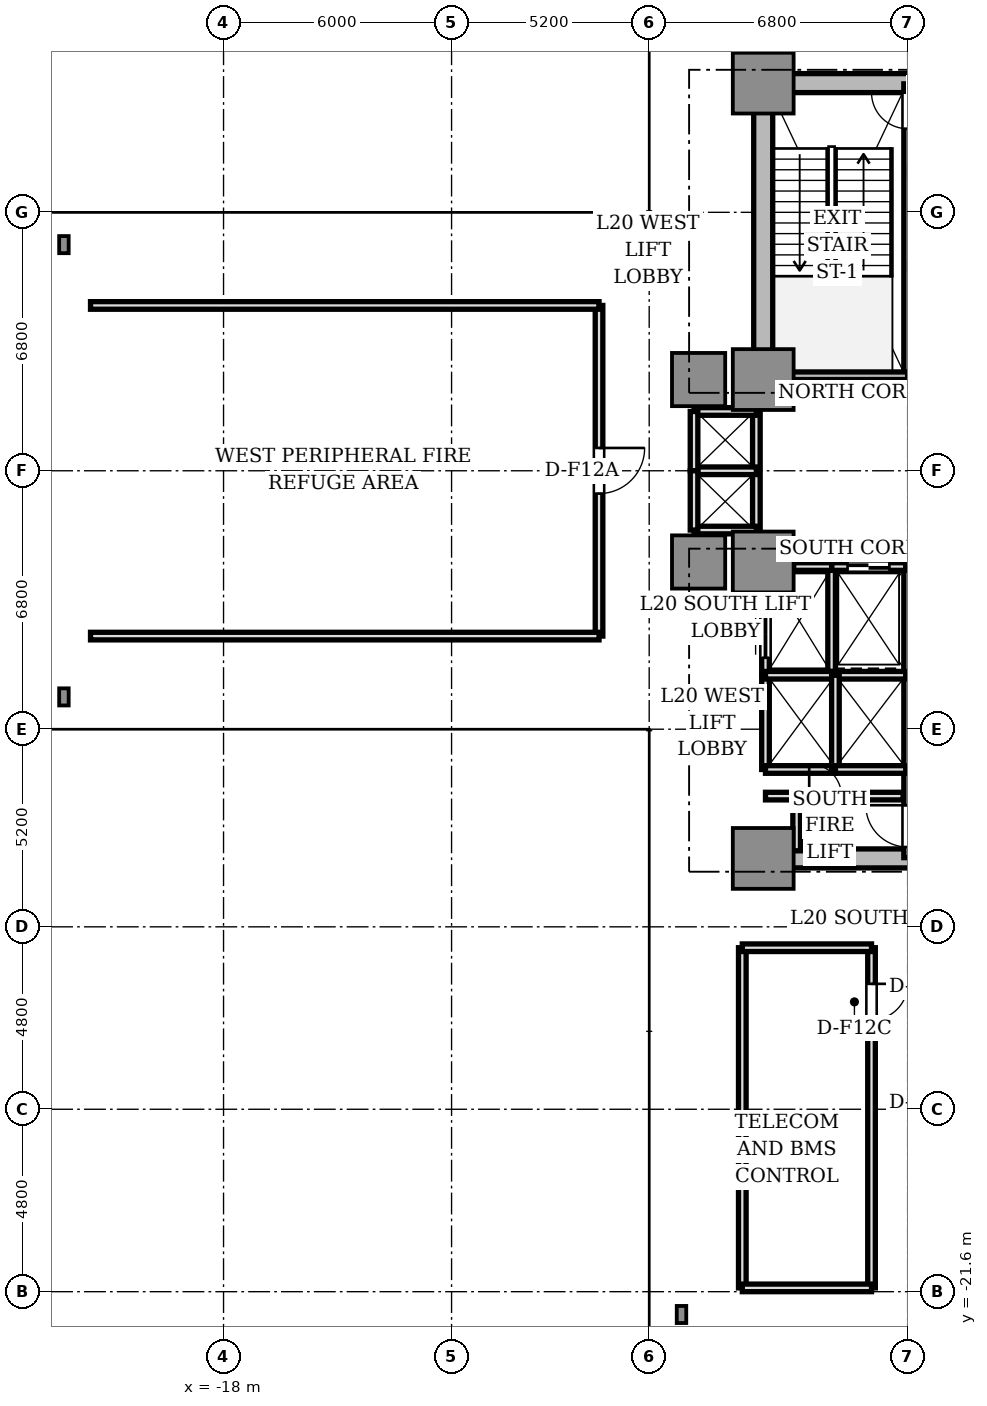
"""IFC4 building model, lengths in metres.
Left out: names, types, materials, properties, quantities, classifications, styles, units other than length and angle.
Written with IfcOpenShell. Run it as: python <this file> out.ifc"""

import sys

from ifc_helpers import new_model, si_unit, direction, frame, frame_2d, origin, origin_2d, place, context, subcontext, project, spatial, rectangle, i_section, extrude, source, transform, mapped, element, fill, save


model = new_model("IFC4")
c1 = context("Model", 3, precision=1e-05, world=origin(), true_north=direction((0.0, 1.0)))
c2 = subcontext(c1, "Body", "Model", "MODEL_VIEW")
j1 = project(units=[si_unit("LENGTHUNIT", "METRE"), si_unit("PLANEANGLEUNIT", "RADIAN")], contexts=[c1])
p1 = place(None, origin())
s1 = spatial("IfcSite", under=j1, at=p1, CompositionType="ELEMENT")
p2 = place(p1, origin())
s2 = spatial("IfcBuilding", under=s1, at=p2, CompositionType="ELEMENT")
p3 = place(p2, frame((0.0, 0.0, 74.5)))
s3 = spatial("IfcBuildingStorey", under=s2, at=p3, CompositionType="ELEMENT", Elevation=74.5)
p4 = place(p3, frame((-3.55, 10.2, 0.0), z_axis=(0.0, 0.0, 1.0), x_axis=(1.0, 0.0, 0.0)))
e1 = element("IfcWall", 1, at=p4, inside=s3, PredefinedType="SHEAR", context=c2, shape_type="SweptSolid", body=[
    extrude(rectangle(XDim=7.1, YDim=0.5, at=frame_2d((3.55, 0.0))), origin(), (0.0, 0.0, 1.0), 4.18),
])
p5 = place(p3, frame((-3.8, 2.85, 0.0), z_axis=(0.0, 0.0, 1.0), x_axis=(0.0, 1.0, 0.0)))
e2 = element("IfcWall", 2, at=p5, inside=s3, PredefinedType="SHEAR", context=c2, shape_type="SweptSolid", body=[
    extrude(rectangle(XDim=6.9, YDim=0.5, at=frame_2d((3.45, 0.0))), origin(), (0.0, 0.0, 1.0), 4.18),
])
p6 = place(p3, frame((-3.55, -10.2, 0.0), z_axis=(0.0, 0.0, 1.0), x_axis=(1.0, 0.0, 0.0)))
e3 = element("IfcWall", 3, at=p6, inside=s3, PredefinedType="SHEAR", context=c2, shape_type="SweptSolid", body=[
    extrude(rectangle(XDim=7.1, YDim=0.5, at=frame_2d((3.55, 0.0))), origin(), (0.0, 0.0, 1.0), 4.18),
])
m1 = source(origin(), c2, "Body", "SweptSolid", [
    extrude(rectangle(XDim=1.6, YDim=1.6, at=origin_2d()), origin(), (0.0, 0.0, 1.0), 4.18),
])
for number, where, z_axis, x_axis in (
    (4, (-3.8, 2.4, 0.0), (0.0, 0.0, 1.0), (1.0, 0.0, 0.0)),
    (5, (-3.8, 10.2, 0.0), (0.0, 0.0, 1.0), (1.0, 0.0, 0.0)),
    (6, (-3.8, -2.4, 0.0), (0.0, 0.0, 1.0), (1.0, 0.0, 0.0)),
    (7, (-3.8, -10.2, 0.0), (0.0, 0.0, 1.0), (1.0, 0.0, 0.0)),
):
    element("IfcColumn", number, at=place(p3, frame(where, z_axis=z_axis, x_axis=x_axis)), inside=s3, PredefinedType="COLUMN", context=c2, shape_type="MappedRepresentation", body=[
        mapped(m1, transform((0.0, 0.0, 0.0), scale=1.0)),
    ])
m2 = source(origin(), c2, "Body", "SweptSolid", [
    extrude(rectangle(XDim=1.4, YDim=1.4, at=origin_2d()), origin(), (0.0, 0.0, 1.0), 4.18),
])
for number, where, z_axis, x_axis in (
    (8, (-5.5, 2.4, 0.0), (0.0, 0.0, 1.0), (1.0, 0.0, 0.0)),
    (9, (-5.5, -2.4, 0.0), (0.0, 0.0, 1.0), (1.0, 0.0, 0.0)),
):
    element("IfcColumn", number, at=place(p3, frame(where, z_axis=z_axis, x_axis=x_axis)), inside=s3, PredefinedType="COLUMN", context=c2, shape_type="MappedRepresentation", body=[
        mapped(m2, transform((0.0, 0.0, 0.0), scale=1.0)),
    ])
m3 = source(origin(), c2, "Body", "SweptSolid", [
    extrude(i_section(OverallWidth=0.25, OverallDepth=0.45, WebThickness=0.014, FlangeThickness=0.014, FilletRadius=0.015, at=origin_2d()), origin(), (0.0, 0.0, 1.0), 4.18),
])
for number, where, z_axis, x_axis in (
    (10, (-22.2, 5.95, 0.0), (0.0, 0.0, 1.0), (1.0, 0.0, 0.0)),
    (11, (-22.2, -5.95, 0.0), (0.0, 0.0, 1.0), (1.0, 0.0, 0.0)),
    (12, (-5.95, -22.2, 0.0), (0.0, 0.0, 1.0), (1.0, 0.0, 0.0)),
):
    element("IfcColumn", number, at=place(p3, frame(where, z_axis=z_axis, x_axis=x_axis)), inside=s3, PredefinedType="COLUMN", context=c2, shape_type="MappedRepresentation", body=[
        mapped(m3, transform((0.0, 0.0, 0.0), scale=1.0)),
    ])
p7 = place(p3, frame((0.0, 2.5, 0.0), z_axis=(0.0, 0.0, 1.0), x_axis=(0.0, 1.0, 0.0)))
e13 = element("IfcWall", 13, at=p7, inside=s3, PredefinedType="SOLIDWALL", context=c2, shape_type="SweptSolid", body=[
    extrude(rectangle(XDim=7.68, YDim=0.2, at=frame_2d((3.84, 0.0))), origin(), (0.0, 0.0, 1.0), 4.18),
])
p8 = place(p7, frame((6.5, 0.0, 0.0)))
e14 = element("IfcOpeningElement", 14, at=p8, cuts=e13, PredefinedType="OPENING", context=c2, shape_type="SweptSolid", body=[
    extrude(rectangle(XDim=0.95, YDim=2.15, at=frame_2d((0.475, 1.075))), frame((0.0, 0.11, 0.0), z_axis=(0.0, -1.0, 0.0), x_axis=(1.0, 0.0, 0.0)), (0.0, 0.0, 1.0), 0.22),
])
p9 = place(p3, frame((-3.72, 2.5, 0.0), z_axis=(0.0, 0.0, 1.0), x_axis=(1.0, 0.0, 0.0)))
e15 = element("IfcWall", 15, at=p9, inside=s3, PredefinedType="SOLIDWALL", context=c2, shape_type="SweptSolid", body=[
    extrude(rectangle(XDim=3.72, YDim=0.2, at=frame_2d((1.86, 0.0))), origin(), (0.0, 0.0, 1.0), 4.18),
])
p10 = place(p3, frame((0.0, -10.18, 0.0), z_axis=(0.0, 0.0, 1.0), x_axis=(0.0, 1.0, 0.0)))
e16 = element("IfcWall", 16, at=p10, inside=s3, PredefinedType="SOLIDWALL", context=c2, shape_type="SweptSolid", body=[
    extrude(rectangle(XDim=7.68, YDim=0.2, at=frame_2d((3.84, 0.0))), origin(), (0.0, 0.0, 1.0), 4.18),
])
p11 = place(p10, frame((0.28, 0.0, 0.0)))
e17 = element("IfcOpeningElement", 17, at=p11, cuts=e16, PredefinedType="OPENING", context=c2, shape_type="SweptSolid", body=[
    extrude(rectangle(XDim=1.1, YDim=2.15, at=frame_2d((0.55, 1.075))), frame((0.0, 0.11, 0.0), z_axis=(0.0, -1.0, 0.0), x_axis=(1.0, 0.0, 0.0)), (0.0, 0.0, 1.0), 0.22),
])
p12 = place(p3, frame((0.0, -2.5, 0.0), z_axis=(0.0, 0.0, 1.0), x_axis=(1.0, 0.0, 0.0)))
e18 = element("IfcWall", 18, at=p12, inside=s3, PredefinedType="SOLIDWALL", context=c2, shape_type="SweptSolid", body=[
    extrude(rectangle(XDim=3.72, YDim=0.2, at=frame_2d((1.86, 0.0))), origin(), (0.0, 0.0, 1.0), 4.18),
])
p13 = place(p3, frame((-2.0, -5.28, 0.0), z_axis=(0.0, 0.0, 1.0), x_axis=(0.0, 1.0, 0.0)))
e19 = element("IfcWall", 19, at=p13, inside=s3, PredefinedType="SOLIDWALL", context=c2, shape_type="SweptSolid", body=[
    extrude(rectangle(XDim=2.78, YDim=0.2, at=frame_2d((1.39, 0.0))), origin(), (0.0, 0.0, 1.0), 3.73),
])
p14 = place(p3, frame((-2.0, -2.52, 0.0), z_axis=(0.0, 0.0, 1.0), x_axis=(1.0, 0.0, 0.0)))
e20 = element("IfcWall", 20, at=p14, inside=s3, PredefinedType="SOLIDWALL", context=c2, shape_type="SweptSolid", body=[
    extrude(rectangle(XDim=1.95, YDim=0.2, at=frame_2d((0.975, 0.0))), origin(), (0.0, 0.0, 1.0), 3.73),
])
p15 = place(p14, frame((0.42, 0.0, 0.0)))
e21 = element("IfcOpeningElement", 21, at=p15, cuts=e20, PredefinedType="OPENING", context=c2, shape_type="SweptSolid", body=[
    extrude(rectangle(XDim=1.1, YDim=2.2, at=frame_2d((0.55, 1.1))), frame((0.0, 0.11, 0.0), z_axis=(0.0, -1.0, 0.0), x_axis=(1.0, 0.0, 0.0)), (0.0, 0.0, 1.0), 0.22),
])
p16 = place(p3, frame((-3.0, -2.52, 0.0), z_axis=(0.0, 0.0, 1.0), x_axis=(1.0, 0.0, 0.0)))
e22 = element("IfcWall", 22, at=p16, inside=s3, PredefinedType="SOLIDWALL", context=c2, shape_type="SweptSolid", body=[
    extrude(rectangle(XDim=1.0, YDim=0.2, at=frame_2d((0.5, 0.0))), origin(), (0.0, 0.0, 1.0), 3.73),
])
p17 = place(p3, frame((-3.74, -5.36, 0.0), z_axis=(0.0, 0.0, 1.0), x_axis=(0.0, 1.0, 0.0)))
e23 = element("IfcWall", 23, at=p17, inside=s3, PredefinedType="SOLIDWALL", context=c2, shape_type="SweptSolid", body=[
    extrude(rectangle(XDim=2.08, YDim=0.2, at=frame_2d((1.04, 0.0))), origin(), (0.0, 0.0, 1.0), 3.73),
])
p18 = place(p17, frame((0.44, 0.0, 0.0)))
e24 = element("IfcOpeningElement", 24, at=p18, cuts=e23, PredefinedType="OPENING", context=c2, shape_type="SweptSolid", body=[
    extrude(rectangle(XDim=1.2, YDim=2.2, at=frame_2d((0.6, 1.1))), frame((0.0, 0.11, 0.0), z_axis=(0.0, -1.0, 0.0), x_axis=(1.0, 0.0, 0.0)), (0.0, 0.0, 1.0), 0.22),
])
p19 = place(p3, frame((-3.74, -7.86, 0.0), z_axis=(0.0, 0.0, 1.0), x_axis=(0.0, 1.0, 0.0)))
e25 = element("IfcWall", 25, at=p19, inside=s3, PredefinedType="SOLIDWALL", context=c2, shape_type="SweptSolid", body=[
    extrude(rectangle(XDim=2.48, YDim=0.2, at=frame_2d((1.24, 0.0))), origin(), (0.0, 0.0, 1.0), 3.73),
])
p20 = place(p3, frame((-3.74, -7.86, 0.0), z_axis=(0.0, 0.0, 1.0), x_axis=(1.0, 0.0, 0.0)))
e26 = element("IfcWall", 26, at=p20, inside=s3, PredefinedType="SOLIDWALL", context=c2, shape_type="SweptSolid", body=[
    extrude(rectangle(XDim=1.84, YDim=0.2, at=frame_2d((0.92, 0.0))), origin(), (0.0, 0.0, 1.0), 3.73),
])
p21 = place(p3, frame((-3.74, -5.38, 0.0), z_axis=(0.0, 0.0, 1.0), x_axis=(1.0, 0.0, 0.0)))
e27 = element("IfcWall", 27, at=p21, inside=s3, PredefinedType="SOLIDWALL", context=c2, shape_type="SweptSolid", body=[
    extrude(rectangle(XDim=3.69, YDim=0.2, at=frame_2d((1.845, 0.0))), origin(), (0.0, 0.0, 1.0), 3.73),
])
p22 = place(p3, frame((-1.9, -7.86, 0.0), z_axis=(0.0, 0.0, 1.0), x_axis=(0.0, 1.0, 0.0)))
e28 = element("IfcWall", 28, at=p22, inside=s3, PredefinedType="SOLIDWALL", context=c2, shape_type="SweptSolid", body=[
    extrude(rectangle(XDim=2.48, YDim=0.2, at=frame_2d((1.24, 0.0))), origin(), (0.0, 0.0, 1.0), 3.73),
])
p23 = place(p3, frame((-1.9, -7.86, 0.0), z_axis=(0.0, 0.0, 1.0), x_axis=(1.0, 0.0, 0.0)))
e29 = element("IfcWall", 29, at=p23, inside=s3, PredefinedType="SOLIDWALL", context=c2, shape_type="SweptSolid", body=[
    extrude(rectangle(XDim=1.85, YDim=0.2, at=frame_2d((0.925, 0.0))), origin(), (0.0, 0.0, 1.0), 3.73),
])
p24 = place(p3, frame((-3.98, -1.56, 0.0), z_axis=(0.0, 0.0, 1.0), x_axis=(0.0, 1.0, 0.0)))
e30 = element("IfcWall", 30, at=p24, inside=s3, PredefinedType="SOLIDWALL", context=c2, shape_type="SweptSolid", body=[
    extrude(rectangle(XDim=3.12, YDim=0.2, at=frame_2d((1.56, 0.0))), origin(), (0.0, 0.0, 1.0), 3.25),
])
for number, where, z_axis, x_axis in (
    (31, (-5.62, 1.56, 0.0), (0.0, 0.0, 1.0), (1.0, 0.0, 0.0)),
    (32, (-5.62, -1.56, 0.0), (0.0, 0.0, 1.0), (1.0, 0.0, 0.0)),
    (33, (-5.62, 0.0, 0.0), (0.0, 0.0, 1.0), (1.0, 0.0, 0.0)),
):
    element("IfcWall", number, at=place(p3, frame(where, z_axis=z_axis, x_axis=x_axis)), inside=s3, PredefinedType="SOLIDWALL", context=c2, shape_type="SweptSolid", body=[
        extrude(rectangle(XDim=1.64, YDim=0.2, at=frame_2d((0.82, 0.0))), origin(), (0.0, 0.0, 1.0), 3.73),
    ])
for number, where, z_axis, x_axis in (
    (34, (-5.62, 0.0, 0.0), (0.0, 0.0, 1.0), (0.0, 1.0, 0.0)),
    (35, (-5.62, -1.56, 0.0), (0.0, 0.0, 1.0), (0.0, 1.0, 0.0)),
):
    element("IfcWall", number, at=place(p3, frame(where, z_axis=z_axis, x_axis=x_axis)), inside=s3, PredefinedType="SOLIDWALL", context=c2, shape_type="SweptSolid", body=[
        extrude(rectangle(XDim=1.56, YDim=0.2, at=frame_2d((0.78, 0.0))), origin(), (0.0, 0.0, 1.0), 3.73),
    ])
p25 = place(p3, frame((-3.74, -8.56, 0.0), z_axis=(0.0, 0.0, 1.0), x_axis=(1.0, 0.0, 0.0)))
e36 = element("IfcWall", 36, at=p25, inside=s3, PredefinedType="SOLIDWALL", context=c2, shape_type="SweptSolid", body=[
    extrude(rectangle(XDim=3.62, YDim=0.2, at=frame_2d((1.81, 0.0))), origin(), (0.0, 0.0, 1.0), 3.73),
])
p26 = place(p25, frame((1.15, 0.0, 0.0)))
e37 = element("IfcOpeningElement", 37, at=p26, cuts=e36, PredefinedType="OPENING", context=c2, shape_type="SweptSolid", body=[
    extrude(rectangle(XDim=0.85, YDim=2.1, at=frame_2d((0.425, 1.05))), frame((0.0, 0.11, 0.0), z_axis=(0.0, -1.0, 0.0), x_axis=(1.0, 0.0, 0.0)), (0.0, 0.0, 1.0), 0.22),
])
p27 = place(p3, frame((-2.92, -10.0, 0.0), z_axis=(0.0, 0.0, 1.0), x_axis=(0.0, 1.0, 0.0)))
e38 = element("IfcWall", 38, at=p27, inside=s3, PredefinedType="SOLIDWALL", context=c2, shape_type="SweptSolid", body=[
    extrude(rectangle(XDim=1.44, YDim=0.2, at=frame_2d((0.72, 0.0))), origin(), (0.0, 0.0, 1.0), 3.73),
])
p28 = place(p3, frame((-8.12, 4.35, 0.0), z_axis=(0.0, 0.0, 1.0), x_axis=(0.0, -1.0, 0.0)))
e39 = element("IfcWall", 39, at=p28, inside=s3, PredefinedType="SOLIDWALL", context=c2, shape_type="SweptSolid", body=[
    extrude(rectangle(XDim=8.7, YDim=0.2, at=frame_2d((4.35, 0.0))), origin(), (0.0, 0.0, 1.0), 3.73),
])
p29 = place(p28, frame((3.75, 0.0, 0.0)))
e40 = element("IfcOpeningElement", 40, at=p29, cuts=e39, PredefinedType="OPENING", context=c2, shape_type="SweptSolid", body=[
    extrude(rectangle(XDim=1.2, YDim=2.2, at=frame_2d((0.6, 1.1))), frame((0.0, 0.11, 0.0), z_axis=(0.0, -1.0, 0.0), x_axis=(1.0, 0.0, 0.0)), (0.0, 0.0, 1.0), 0.22),
])
for number, where, z_axis, x_axis in (
    (41, (-8.12, -4.35, 0.0), (0.0, 0.0, 1.0), (-1.0, 0.0, 0.0)),
    (42, (-8.12, 4.35, 0.0), (0.0, 0.0, 1.0), (-1.0, 0.0, 0.0)),
):
    element("IfcWall", number, at=place(p3, frame(where, z_axis=z_axis, x_axis=x_axis)), inside=s3, PredefinedType="SOLIDWALL", context=c2, shape_type="SweptSolid", body=[
        extrude(rectangle(XDim=13.38, YDim=0.2, at=frame_2d((6.69, 0.0))), origin(), (0.0, 0.0, 1.0), 2.65),
    ])
p30 = place(p3, frame((-0.95, -12.55, 0.0), z_axis=(0.0, 0.0, 1.0), x_axis=(0.0, -1.0, 0.0)))
e43 = element("IfcWall", 43, at=p30, inside=s3, PredefinedType="SOLIDWALL", context=c2, shape_type="SweptSolid", body=[
    extrude(rectangle(XDim=8.95, YDim=0.2, at=frame_2d((4.475, 0.0))), origin(), (0.0, 0.0, 1.0), 3.73),
])
p31 = place(p30, frame((0.95, 0.0, 0.0)))
e44 = element("IfcOpeningElement", 44, at=p31, cuts=e43, PredefinedType="OPENING", context=c2, shape_type="SweptSolid", body=[
    extrude(rectangle(XDim=0.95, YDim=2.15, at=frame_2d((0.475, 1.075))), frame((0.0, 0.11, 0.0), z_axis=(0.0, -1.0, 0.0), x_axis=(1.0, 0.0, 0.0)), (0.0, 0.0, 1.0), 0.22),
])
p32 = place(p3, frame((-4.35, -12.55, 0.0), z_axis=(0.0, 0.0, 1.0), x_axis=(0.0, -1.0, 0.0)))
e45 = element("IfcWall", 45, at=p32, inside=s3, PredefinedType="SOLIDWALL", context=c2, shape_type="SweptSolid", body=[
    extrude(rectangle(XDim=8.95, YDim=0.2, at=frame_2d((4.475, 0.0))), origin(), (0.0, 0.0, 1.0), 2.65),
])
p33 = place(p3, frame((-4.35, -12.55, 0.0), z_axis=(0.0, 0.0, 1.0), x_axis=(1.0, 0.0, 0.0)))
e46 = element("IfcWall", 46, at=p33, inside=s3, PredefinedType="SOLIDWALL", context=c2, shape_type="SweptSolid", body=[
    extrude(rectangle(XDim=3.4, YDim=0.2, at=frame_2d((1.7, 0.0))), origin(), (0.0, 0.0, 1.0), 3.73),
])
p34 = place(p3, frame((-4.35, -21.5, 0.0), z_axis=(0.0, 0.0, 1.0), x_axis=(1.0, 0.0, 0.0)))
e47 = element("IfcWall", 47, at=p34, inside=s3, PredefinedType="SOLIDWALL", context=c2, shape_type="SweptSolid", body=[
    extrude(rectangle(XDim=3.4, YDim=0.2, at=frame_2d((1.7, 0.0))), origin(), (0.0, 0.0, 1.0), 2.65),
])
m4 = source(origin(), c2, "Body", "SweptSolid", [
    extrude(rectangle(XDim=1.1, YDim=0.05, at=origin_2d()), origin(), (0.0, 0.0, 1.0), 2.2),
])
p35 = place(p15, frame((0.55, 0.0, 0.0)))
e48 = element("IfcDoor", 48, at=p35, inside=s3, OperationType="DOUBLE_DOOR_SLIDING", PredefinedType="DOOR", context=c2, shape_type="MappedRepresentation", body=[
    mapped(m4, transform((0.0, 0.0, 0.0), scale=1.0)),
])
fill(e21, e48)
m5 = source(origin(), c2, "Body", "SweptSolid", [
    extrude(rectangle(XDim=1.2, YDim=0.05, at=origin_2d()), origin(), (0.0, 0.0, 1.0), 2.2),
])
p36 = place(p18, frame((0.6, 0.0, 0.0)))
e49 = element("IfcDoor", 49, at=p36, inside=s3, OperationType="DOUBLE_DOOR_SLIDING", PredefinedType="DOOR", context=c2, shape_type="MappedRepresentation", body=[
    mapped(m5, transform((0.0, 0.0, 0.0), scale=1.0)),
])
fill(e24, e49)
m6 = source(origin(), c2, "Body", "SweptSolid", [
    extrude(rectangle(XDim=0.95, YDim=0.05, at=origin_2d()), origin(), (0.0, 0.0, 1.0), 2.15),
])
p37 = place(p8, frame((0.475, 0.0, 0.0)))
e50 = element("IfcDoor", 50, at=p37, inside=s3, OperationType="SINGLE_SWING_RIGHT", PredefinedType="DOOR", context=c2, shape_type="MappedRepresentation", body=[
    mapped(m6, transform((0.0, 0.0, 0.0), scale=1.0)),
])
fill(e14, e50)
m7 = source(origin(), c2, "Body", "SweptSolid", [
    extrude(rectangle(XDim=1.1, YDim=0.05, at=origin_2d()), origin(), (0.0, 0.0, 1.0), 2.15),
])
p38 = place(p11, frame((0.55, 0.0, 0.0)))
e51 = element("IfcDoor", 51, at=p38, inside=s3, OperationType="SINGLE_SWING_RIGHT", PredefinedType="DOOR", context=c2, shape_type="MappedRepresentation", body=[
    mapped(m7, transform((0.0, 0.0, 0.0), scale=1.0)),
])
fill(e17, e51)
m8 = source(origin(), c2, "Body", "SweptSolid", [
    extrude(rectangle(XDim=0.85, YDim=0.05, at=origin_2d()), origin(), (0.0, 0.0, 1.0), 2.1),
])
p39 = place(p26, frame((0.425, 0.0, 0.0)))
e52 = element("IfcDoor", 52, at=p39, inside=s3, OperationType="SINGLE_SWING_LEFT", PredefinedType="DOOR", context=c2, shape_type="MappedRepresentation", body=[
    mapped(m8, transform((0.0, 0.0, 0.0), scale=1.0)),
])
fill(e37, e52)
p40 = place(p29, frame((0.6, 0.0, 0.0)))
e53 = element("IfcDoor", 53, at=p40, inside=s3, OperationType="SINGLE_SWING_LEFT", PredefinedType="DOOR", context=c2, shape_type="MappedRepresentation", body=[
    mapped(m5, transform((0.0, 0.0, 0.0), scale=1.0)),
])
fill(e40, e53)
p41 = place(p31, frame((0.475, 0.0, 0.0)))
e54 = element("IfcDoor", 54, at=p41, inside=s3, OperationType="SINGLE_SWING_LEFT", PredefinedType="DOOR", context=c2, shape_type="MappedRepresentation", body=[
    mapped(m6, transform((0.0, 0.0, 0.0), scale=1.0)),
])
fill(e44, e54)
save(model, sys.argv[1])
